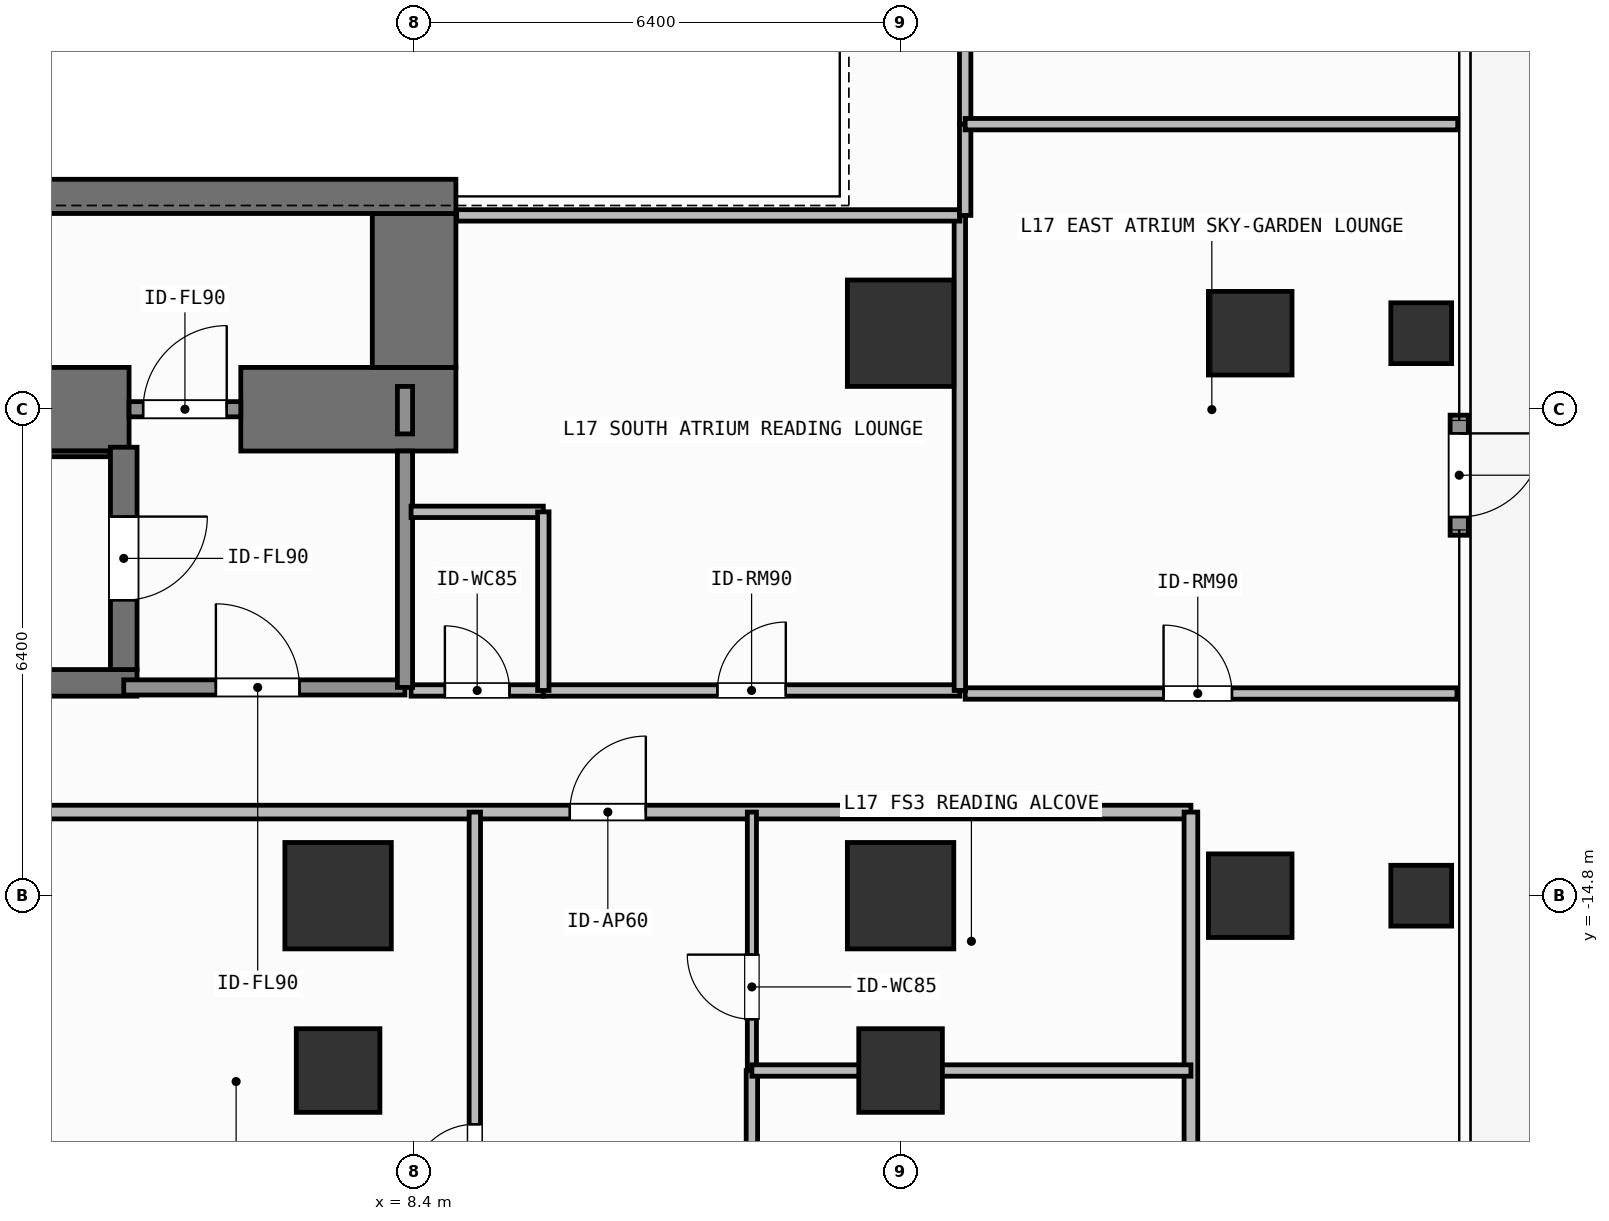
"""IFC4 building model, lengths in metres.
Left out: names, types, materials, properties, quantities, classifications, styles, units other than length and angle.
Written with IfcOpenShell. Run it as: python <this file> out.ifc"""

import sys

from ifc_helpers import new_model, si_unit, direction, frame, frame_2d, origin, origin_2d, place, context, subcontext, project, spatial, rectangle, hollow_rectangle, extrude, element, fill, save


model = new_model("IFC4")
c1 = context("Model", 3, precision=1e-05, world=origin(), true_north=direction((0.0, 1.0)))
c2 = subcontext(c1, "Body", "Model", "MODEL_VIEW")
j1 = project(units=[si_unit("LENGTHUNIT", "METRE"), si_unit("PLANEANGLEUNIT", "RADIAN")], contexts=[c1])
p1 = place(None, origin())
s1 = spatial("IfcSite", under=j1, at=p1, CompositionType="ELEMENT")
p2 = place(p1, origin())
s2 = spatial("IfcBuilding", under=s1, at=p2, CompositionType="ELEMENT")
p3 = place(p2, frame((0.0, 0.0, 65.7)))
s3 = spatial("IfcBuildingStorey", under=s2, at=p3, CompositionType="ELEMENT", Elevation=65.7)
p4 = place(p3, frame((-2.62, -8.4, 0.0), z_axis=(0.0, 0.0, 1.0), x_axis=(1.0, 0.0, 0.0)))
e1 = element("IfcWall", 1, at=p4, inside=s3, PredefinedType="SHEAR", context=c2, shape_type="SweptSolid", body=[
    extrude(rectangle(XDim=7.27, YDim=1.1, at=frame_2d((3.635, 0.0))), origin(), (0.0, 0.0, 1.0), 3.9),
])
p5 = place(p3, frame((6.12, -8.4, 0.0), z_axis=(0.0, 0.0, 1.0), x_axis=(1.0, 0.0, 0.0)))
e2 = element("IfcWall", 2, at=p5, inside=s3, PredefinedType="SHEAR", context=c2, shape_type="SweptSolid", body=[
    extrude(rectangle(XDim=2.83, YDim=1.1, at=frame_2d((1.415, 0.0))), origin(), (0.0, 0.0, 1.0), 3.9),
])
p6 = place(p3, frame((8.4, -7.85, 0.0), z_axis=(0.0, 0.0, 1.0), x_axis=(0.0, 1.0, 0.0)))
e3 = element("IfcWall", 3, at=p6, inside=s3, PredefinedType="SHEAR", context=c2, shape_type="SweptSolid", body=[
    extrude(rectangle(XDim=2.025, YDim=1.1, at=frame_2d((1.013, 0.0))), origin(), (0.0, 0.0, 1.0), 3.9),
])
p7 = place(p3, frame((3.045, -5.6, 0.0), z_axis=(0.0, 0.0, 1.0), x_axis=(1.0, 0.0, 0.0)))
e4 = element("IfcWall", 4, at=p7, inside=s3, PredefinedType="SHEAR", context=c2, shape_type="SweptSolid", body=[
    extrude(rectangle(XDim=5.905, YDim=0.45, at=frame_2d((2.953, 0.0))), origin(), (0.0, 0.0, 1.0), 3.9),
])
p8 = place(p3, frame((-2.555, -12.0, 0.0), z_axis=(0.0, 0.0, 1.0), x_axis=(1.0, 0.0, 0.0)))
e5 = element("IfcWall", 5, at=p8, inside=s3, PredefinedType="SHEAR", context=c2, shape_type="SweptSolid", body=[
    extrude(rectangle(XDim=7.31, YDim=0.35, at=frame_2d((3.655, 0.0))), origin(), (0.0, 0.0, 1.0), 3.9),
])
p9 = place(p3, frame((-2.2, -8.988, 0.0), z_axis=(0.0, 0.0, 1.0), x_axis=(1.0, 0.0, 0.0)))
e6 = element("IfcWall", 6, at=p9, inside=s3, PredefinedType="SHEAR", context=c2, shape_type="SweptSolid", body=[
    extrude(rectangle(XDim=6.6, YDim=0.075, at=frame_2d((3.3, 0.0))), origin(), (0.0, 0.0, 1.0), 3.9),
])
p10 = place(p3, frame((4.58, -8.9, 0.0), z_axis=(0.0, 0.0, 1.0), x_axis=(0.0, -1.0, 0.0)))
e7 = element("IfcWall", 7, at=p10, inside=s3, PredefinedType="SHEAR", context=c2, shape_type="SweptSolid", body=[
    extrude(rectangle(XDim=2.925, YDim=0.35, at=frame_2d((1.462, 0.0))), origin(), (0.0, 0.0, 1.0), 3.9),
])
p11 = place(p10, frame((0.913, 0.0, 0.0)))
e8 = element("IfcOpeningElement", 8, at=p11, cuts=e7, PredefinedType="OPENING", context=c2, shape_type="SweptSolid", body=[
    extrude(rectangle(XDim=1.1, YDim=2.15, at=frame_2d((0.55, 1.075))), frame((0.0, 0.185, 0.0), z_axis=(0.0, -1.0, 0.0), x_axis=(1.0, 0.0, 0.0)), (0.0, 0.0, 1.0), 0.37),
])
for number, where, z_axis, x_axis in (
    (9, (7.4, -14.8, 0.0), (0.0, 0.0, 1.0), (1.0, 0.0, 0.0)),
    (10, (14.8, -14.8, 0.0), (0.0, 0.0, 1.0), (1.0, 0.0, 0.0)),
    (11, (14.8, -7.4, 0.0), (0.0, 0.0, 1.0), (1.0, 0.0, 0.0)),
):
    element("IfcColumn", number, at=place(p3, frame(where, z_axis=z_axis, x_axis=x_axis)), inside=s3, PredefinedType="COLUMN", context=c2, shape_type="SweptSolid", body=[
        extrude(rectangle(XDim=1.4, YDim=1.4, at=origin_2d()), origin(), (0.0, 0.0, 1.0), 3.9),
    ])
for number, where, z_axis, x_axis in (
    (12, (19.4, -14.8, 0.0), (0.0, 0.0, 1.0), (1.0, 0.0, 0.0)),
    (13, (19.4, -7.4, 0.0), (0.0, 0.0, 1.0), (1.0, 0.0, 0.0)),
    (14, (7.4, -17.1, 0.0), (0.0, 0.0, 1.0), (1.0, 0.0, 0.0)),
    (15, (14.8, -17.1, 0.0), (0.0, 0.0, 1.0), (1.0, 0.0, 0.0)),
):
    element("IfcColumn", number, at=place(p3, frame(where, z_axis=z_axis, x_axis=x_axis)), inside=s3, PredefinedType="COLUMN", context=c2, shape_type="SweptSolid", body=[
        extrude(rectangle(XDim=1.1, YDim=1.1, at=origin_2d()), origin(), (0.0, 0.0, 1.0), 3.9),
    ])
for number, where, z_axis, x_axis in (
    (16, (21.65, -14.8, 0.0), (0.0, 0.0, 1.0), (1.0, 0.0, 0.0)),
    (17, (21.65, -7.4, 0.0), (0.0, 0.0, 1.0), (1.0, 0.0, 0.0)),
):
    element("IfcColumn", number, at=place(p3, frame(where, z_axis=z_axis, x_axis=x_axis)), inside=s3, PredefinedType="COLUMN", context=c2, shape_type="SweptSolid", body=[
        extrude(hollow_rectangle(XDim=0.8, YDim=0.8, WallThickness=0.036, at=origin_2d()), origin(), (0.0, 0.0, 1.0), 3.9),
    ])
p12 = place(p3, frame((22.15, -8.478, 0.0), z_axis=(0.0, 0.0, 1.0), x_axis=(0.0, -1.0, 0.0)))
e18 = element("IfcWall", 18, at=p12, inside=s3, PredefinedType="SOLIDWALL", context=c2, shape_type="SweptSolid", body=[
    extrude(rectangle(XDim=1.58, YDim=0.24, at=frame_2d((0.79, 0.0))), origin(), (0.0, 0.0, 1.0), 3.68),
])
p13 = place(p12, frame((0.24, 0.0, 0.0)))
e19 = element("IfcOpeningElement", 19, at=p13, cuts=e18, PredefinedType="OPENING", context=c2, shape_type="SweptSolid", body=[
    extrude(rectangle(XDim=1.1, YDim=2.2, at=frame_2d((0.55, 1.1))), frame((0.0, 0.13, 0.0), z_axis=(0.0, -1.0, 0.0), x_axis=(1.0, 0.0, 0.0)), (0.0, 0.0, 1.0), 0.26),
])
p14 = place(p3, frame((4.58, -12.06, 0.0), z_axis=(0.0, 0.0, 1.0), x_axis=(1.0, 0.0, 0.0)))
e20 = element("IfcWall", 20, at=p14, inside=s3, PredefinedType="SOLIDWALL", context=c2, shape_type="SweptSolid", body=[
    extrude(rectangle(XDim=3.7, YDim=0.2, at=frame_2d((1.85, 0.0))), origin(), (0.0, 0.0, 1.0), 3.68),
])
p15 = place(p14, frame((1.212, 0.0, 0.0)))
e21 = element("IfcOpeningElement", 21, at=p15, cuts=e20, PredefinedType="OPENING", context=c2, shape_type="SweptSolid", body=[
    extrude(rectangle(XDim=1.1, YDim=2.15, at=frame_2d((0.55, 1.075))), frame((0.0, 0.11, 0.0), z_axis=(0.0, -1.0, 0.0), x_axis=(1.0, 0.0, 0.0)), (0.0, 0.0, 1.0), 0.22),
])
p16 = place(p3, frame((4.65, -8.4, 0.0), z_axis=(0.0, 0.0, 1.0), x_axis=(1.0, 0.0, 0.0)))
e22 = element("IfcWall", 22, at=p16, inside=s3, PredefinedType="SOLIDWALL", context=c2, shape_type="SweptSolid", body=[
    extrude(rectangle(XDim=1.47, YDim=0.2, at=frame_2d((0.735, 0.0))), origin(), (0.0, 0.0, 1.0), 2.72),
])
p17 = place(p16, frame((0.185, 0.0, 0.0)))
e23 = element("IfcOpeningElement", 23, at=p17, cuts=e22, PredefinedType="OPENING", context=c2, shape_type="SweptSolid", body=[
    extrude(rectangle(XDim=1.1, YDim=2.15, at=frame_2d((0.55, 1.075))), frame((0.0, 0.11, 0.0), z_axis=(0.0, -1.0, 0.0), x_axis=(1.0, 0.0, 0.0)), (0.0, 0.0, 1.0), 0.22),
])
p18 = place(p3, frame((8.36, -12.1, 0.0), z_axis=(0.0, 0.0, 1.0), x_axis=(1.0, 0.0, 0.0)))
e24 = element("IfcWall", 24, at=p18, inside=s3, PredefinedType="PARTITIONING", context=c2, shape_type="SweptSolid", body=[
    extrude(rectangle(XDim=1.74, YDim=0.15, at=frame_2d((0.87, 0.0))), origin(), (0.0, 0.0, 1.0), 3.68),
])
p19 = place(p18, frame((0.445, 0.0, 0.0)))
e25 = element("IfcOpeningElement", 25, at=p19, cuts=e24, PredefinedType="OPENING", context=c2, shape_type="SweptSolid", body=[
    extrude(rectangle(XDim=0.85, YDim=2.1, at=frame_2d((0.425, 1.05))), frame((0.0, 0.085, 0.0), z_axis=(0.0, -1.0, 0.0), x_axis=(1.0, 0.0, 0.0)), (0.0, 0.0, 1.0), 0.17),
])
p20 = place(p3, frame((10.1, -12.1, 0.0), z_axis=(0.0, 0.0, 1.0), x_axis=(1.0, 0.0, 0.0)))
e26 = element("IfcWall", 26, at=p20, inside=s3, PredefinedType="PARTITIONING", context=c2, shape_type="SweptSolid", body=[
    extrude(rectangle(XDim=5.48, YDim=0.15, at=frame_2d((2.74, 0.0))), origin(), (0.0, 0.0, 1.0), 3.68),
])
p21 = place(p20, frame((2.29, 0.0, 0.0)))
e27 = element("IfcOpeningElement", 27, at=p21, cuts=e26, PredefinedType="OPENING", context=c2, shape_type="SweptSolid", body=[
    extrude(rectangle(XDim=0.9, YDim=2.1, at=frame_2d((0.45, 1.05))), frame((0.0, 0.085, 0.0), z_axis=(0.0, -1.0, 0.0), x_axis=(1.0, 0.0, 0.0)), (0.0, 0.0, 1.0), 0.17),
])
p22 = place(p3, frame((2.918, -13.7, 0.0), z_axis=(0.0, 0.0, 1.0), x_axis=(1.0, 0.0, 0.0)))
e28 = element("IfcWall", 28, at=p22, inside=s3, PredefinedType="PARTITIONING", context=c2, shape_type="SweptSolid", body=[
    extrude(rectangle(XDim=15.702, YDim=0.18, at=frame_2d((7.851, 0.0))), origin(), (0.0, 0.0, 1.0), 3.68),
])
p23 = place(p22, frame((7.531, 0.0, 0.0)))
e29 = element("IfcOpeningElement", 29, at=p23, cuts=e28, PredefinedType="OPENING", context=c2, shape_type="SweptSolid", body=[
    extrude(rectangle(XDim=1.0, YDim=2.2, at=frame_2d((0.5, 1.1))), frame((0.0, 0.1, 0.0), z_axis=(0.0, -1.0, 0.0), x_axis=(1.0, 0.0, 0.0)), (0.0, 0.0, 1.0), 0.2),
])
p24 = place(p3, frame((9.199, -20.79, 0.0), z_axis=(0.0, 0.0, 1.0), x_axis=(0.0, 1.0, 0.0)))
e30 = element("IfcWall", 30, at=p24, inside=s3, PredefinedType="PARTITIONING", context=c2, shape_type="SweptSolid", body=[
    extrude(rectangle(XDim=7.09, YDim=0.15, at=frame_2d((3.545, 0.0))), origin(), (0.0, 0.0, 1.0), 3.68),
])
p25 = place(p24, frame((2.133, 0.0, 0.0)))
e31 = element("IfcOpeningElement", 31, at=p25, cuts=e30, PredefinedType="OPENING", context=c2, shape_type="SweptSolid", body=[
    extrude(rectangle(XDim=0.85, YDim=2.1, at=frame_2d((0.425, 1.05))), frame((0.0, 0.085, 0.0), z_axis=(0.0, -1.0, 0.0), x_axis=(1.0, 0.0, 0.0)), (0.0, 0.0, 1.0), 0.17),
])
p26 = place(p3, frame((12.844, -20.79, 0.0), z_axis=(0.0, 0.0, 1.0), x_axis=(0.0, 1.0, 0.0)))
e32 = element("IfcWall", 32, at=p26, inside=s3, PredefinedType="PARTITIONING", context=c2, shape_type="SweptSolid", body=[
    extrude(rectangle(XDim=3.69, YDim=0.15, at=frame_2d((1.845, 0.0))), origin(), (0.0, 0.0, 1.0), 3.68),
])
p27 = place(p26, frame((1.42, 0.0, 0.0)))
e33 = element("IfcOpeningElement", 33, at=p27, cuts=e32, PredefinedType="OPENING", context=c2, shape_type="SweptSolid", body=[
    extrude(rectangle(XDim=0.85, YDim=2.1, at=frame_2d((0.425, 1.05))), frame((0.0, 0.085, 0.0), z_axis=(0.0, -1.0, 0.0), x_axis=(1.0, 0.0, 0.0)), (0.0, 0.0, 1.0), 0.17),
])
p28 = place(p3, frame((12.844, -17.1, 0.0), z_axis=(0.0, 0.0, 1.0), x_axis=(0.0, 1.0, 0.0)))
e34 = element("IfcWall", 34, at=p28, inside=s3, PredefinedType="PARTITIONING", context=c2, shape_type="SweptSolid", body=[
    extrude(rectangle(XDim=3.4, YDim=0.12, at=frame_2d((1.7, 0.0))), origin(), (0.0, 0.0, 1.0), 3.68),
])
p29 = place(p28, frame((0.675, 0.0, 0.0)))
e35 = element("IfcOpeningElement", 35, at=p29, cuts=e34, PredefinedType="OPENING", context=c2, shape_type="SweptSolid", body=[
    extrude(rectangle(XDim=0.85, YDim=2.1, at=frame_2d((0.425, 1.05))), frame((0.0, 0.07, 0.0), z_axis=(0.0, -1.0, 0.0), x_axis=(1.0, 0.0, 0.0)), (0.0, 0.0, 1.0), 0.14),
])
p30 = place(p3, frame((15.65, -12.14, 0.0), z_axis=(0.0, 0.0, 1.0), x_axis=(1.0, 0.0, 0.0)))
e36 = element("IfcWall", 36, at=p30, inside=s3, PredefinedType="PARTITIONING", context=c2, shape_type="SweptSolid", body=[
    extrude(rectangle(XDim=6.47, YDim=0.15, at=frame_2d((3.235, 0.0))), origin(), (0.0, 0.0, 1.0), 3.68),
])
p31 = place(p30, frame((2.61, 0.0, 0.0)))
e37 = element("IfcOpeningElement", 37, at=p31, cuts=e36, PredefinedType="OPENING", context=c2, shape_type="SweptSolid", body=[
    extrude(rectangle(XDim=0.9, YDim=2.1, at=frame_2d((0.45, 1.05))), frame((0.0, 0.085, 0.0), z_axis=(0.0, -1.0, 0.0), x_axis=(1.0, 0.0, 0.0)), (0.0, 0.0, 1.0), 0.17),
])
p32 = place(p3, frame((8.28, -12.06, 0.0), z_axis=(0.0, 0.0, 1.0), x_axis=(0.0, 1.0, 0.0)))
e38 = element("IfcWall", 38, at=p32, inside=s3, PredefinedType="SOLIDWALL", context=c2, shape_type="SweptSolid", body=[
    extrude(rectangle(XDim=3.11, YDim=0.2, at=frame_2d((1.555, 0.0))), origin(), (0.0, 0.0, 1.0), 3.68),
])
p33 = place(p3, frame((8.28, -8.725, 0.0), z_axis=(0.0, 0.0, 1.0), x_axis=(0.0, 1.0, 0.0)))
e39 = element("IfcWall", 39, at=p33, inside=s3, PredefinedType="SOLIDWALL", context=c2, shape_type="SweptSolid", body=[
    extrude(rectangle(XDim=0.625, YDim=0.2, at=frame_2d((0.312, 0.0))), origin(), (0.0, 0.0, 1.0), 3.68),
])
p34 = place(p3, frame((8.36, -9.75, 0.0), z_axis=(0.0, 0.0, 1.0), x_axis=(1.0, 0.0, 0.0)))
e40 = element("IfcWall", 40, at=p34, inside=s3, PredefinedType="PARTITIONING", context=c2, shape_type="SweptSolid", body=[
    extrude(rectangle(XDim=1.74, YDim=0.15, at=frame_2d((0.87, 0.0))), origin(), (0.0, 0.0, 1.0), 3.68),
])
p35 = place(p3, frame((10.1, -12.1, 0.0), z_axis=(0.0, 0.0, 1.0), x_axis=(0.0, 1.0, 0.0)))
e41 = element("IfcWall", 41, at=p35, inside=s3, PredefinedType="PARTITIONING", context=c2, shape_type="SweptSolid", body=[
    extrude(rectangle(XDim=2.35, YDim=0.15, at=frame_2d((1.175, 0.0))), origin(), (0.0, 0.0, 1.0), 3.68),
])
p36 = place(p3, frame((15.58, -12.1, 0.0), z_axis=(0.0, 0.0, 1.0), x_axis=(0.0, 1.0, 0.0)))
e42 = element("IfcWall", 42, at=p36, inside=s3, PredefinedType="PARTITIONING", context=c2, shape_type="SweptSolid", body=[
    extrude(rectangle(XDim=6.25, YDim=0.15, at=frame_2d((3.125, 0.0))), origin(), (0.0, 0.0, 1.0), 3.68),
])
p37 = place(p3, frame((8.96, -5.85, 0.0), z_axis=(0.0, 0.0, 1.0), x_axis=(1.0, 0.0, 0.0)))
e43 = element("IfcWall", 43, at=p37, inside=s3, PredefinedType="PARTITIONING", context=c2, shape_type="SweptSolid", body=[
    extrude(rectangle(XDim=6.62, YDim=0.15, at=frame_2d((3.31, 0.0))), origin(), (0.0, 0.0, 1.0), 3.68),
])
p38 = place(p3, frame((18.62, -23.91, 0.0), z_axis=(0.0, 0.0, 1.0), x_axis=(0.0, 1.0, 0.0)))
e44 = element("IfcWall", 44, at=p38, inside=s3, PredefinedType="PARTITIONING", context=c2, shape_type="SweptSolid", body=[
    extrude(rectangle(XDim=10.21, YDim=0.18, at=frame_2d((5.105, 0.0))), origin(), (0.0, 0.0, 1.0), 3.68),
])
p39 = place(p3, frame((12.844, -17.1, 0.0), z_axis=(0.0, 0.0, 1.0), x_axis=(1.0, 0.0, 0.0)))
e45 = element("IfcWall", 45, at=p39, inside=s3, PredefinedType="PARTITIONING", context=c2, shape_type="SweptSolid", body=[
    extrude(rectangle(XDim=5.776, YDim=0.15, at=frame_2d((2.888, 0.0))), origin(), (0.0, 0.0, 1.0), 3.082),
])
p40 = place(p3, frame((15.65, -5.85, 0.0), z_axis=(0.0, 0.0, 1.0), x_axis=(0.0, 1.0, 0.0)))
e46 = element("IfcWall", 46, at=p40, inside=s3, PredefinedType="PARTITIONING", context=c2, shape_type="SweptSolid", body=[
    extrude(rectangle(XDim=1.2, YDim=0.15, at=frame_2d((0.6, 0.0))), origin(), (0.0, 0.0, 1.0), 3.68),
])
p41 = place(p3, frame((15.65, -4.65, 0.0), z_axis=(0.0, 0.0, 1.0), x_axis=(0.0, 1.0, 0.0)))
e47 = element("IfcWall", 47, at=p41, inside=s3, PredefinedType="PARTITIONING", context=c2, shape_type="SweptSolid", body=[
    extrude(rectangle(XDim=10.5, YDim=0.15, at=frame_2d((5.25, 0.0))), origin(), (0.0, 0.0, 1.0), 3.68),
])
p42 = place(p3, frame((15.65, -4.65, 0.0), z_axis=(0.0, 0.0, 1.0), x_axis=(1.0, 0.0, 0.0)))
e48 = element("IfcWall", 48, at=p42, inside=s3, PredefinedType="PARTITIONING", context=c2, shape_type="SweptSolid", body=[
    extrude(rectangle(XDim=6.48, YDim=0.15, at=frame_2d((3.24, 0.0))), origin(), (0.0, 0.0, 1.0), 3.68),
])
p43 = place(p13, origin())
e49 = element("IfcDoor", 49, at=p43, inside=s3, OperationType="SINGLE_SWING_LEFT", PredefinedType="DOOR", context=c2, shape_type="SweptSolid", body=[
    extrude(rectangle(XDim=1.1, YDim=2.2, at=frame_2d((0.55, 1.1))), frame((0.0, 0.025, 0.0), z_axis=(0.0, -1.0, 0.0), x_axis=(1.0, 0.0, 0.0)), (0.0, 0.0, 1.0), 0.05),
])
fill(e19, e49)
p44 = place(p11, origin())
e50 = element("IfcDoor", 50, at=p44, inside=s3, OperationType="SINGLE_SWING_LEFT", PredefinedType="DOOR", context=c2, shape_type="SweptSolid", body=[
    extrude(rectangle(XDim=1.1, YDim=2.15, at=frame_2d((0.55, 1.075))), frame((0.0, 0.025, 0.0), z_axis=(0.0, -1.0, 0.0), x_axis=(1.0, 0.0, 0.0)), (0.0, 0.0, 1.0), 0.05),
])
fill(e8, e50)
p45 = place(p15, origin())
e51 = element("IfcDoor", 51, at=p45, inside=s3, OperationType="SINGLE_SWING_LEFT", PredefinedType="DOOR", context=c2, shape_type="SweptSolid", body=[
    extrude(rectangle(XDim=1.1, YDim=2.15, at=frame_2d((0.55, 1.075))), frame((0.0, 0.025, 0.0), z_axis=(0.0, -1.0, 0.0), x_axis=(1.0, 0.0, 0.0)), (0.0, 0.0, 1.0), 0.05),
])
fill(e21, e51)
p46 = place(p17, origin())
e52 = element("IfcDoor", 52, at=p46, inside=s3, OperationType="SINGLE_SWING_RIGHT", PredefinedType="DOOR", context=c2, shape_type="SweptSolid", body=[
    extrude(rectangle(XDim=1.1, YDim=2.15, at=frame_2d((0.55, 1.075))), frame((0.0, 0.025, 0.0), z_axis=(0.0, -1.0, 0.0), x_axis=(1.0, 0.0, 0.0)), (0.0, 0.0, 1.0), 0.05),
])
fill(e23, e52)
p47 = place(p19, origin())
e53 = element("IfcDoor", 53, at=p47, inside=s3, OperationType="SINGLE_SWING_LEFT", PredefinedType="DOOR", context=c2, shape_type="SweptSolid", body=[
    extrude(rectangle(XDim=0.85, YDim=2.1, at=frame_2d((0.425, 1.05))), frame((0.0, 0.025, 0.0), z_axis=(0.0, -1.0, 0.0), x_axis=(1.0, 0.0, 0.0)), (0.0, 0.0, 1.0), 0.05),
])
fill(e25, e53)
p48 = place(p21, origin())
e54 = element("IfcDoor", 54, at=p48, inside=s3, OperationType="SINGLE_SWING_RIGHT", PredefinedType="DOOR", context=c2, shape_type="SweptSolid", body=[
    extrude(rectangle(XDim=0.9, YDim=2.1, at=frame_2d((0.45, 1.05))), frame((0.0, 0.025, 0.0), z_axis=(0.0, -1.0, 0.0), x_axis=(1.0, 0.0, 0.0)), (0.0, 0.0, 1.0), 0.05),
])
fill(e27, e54)
p49 = place(p23, origin())
e55 = element("IfcDoor", 55, at=p49, inside=s3, OperationType="SINGLE_SWING_RIGHT", PredefinedType="DOOR", context=c2, shape_type="SweptSolid", body=[
    extrude(rectangle(XDim=1.0, YDim=2.2, at=frame_2d((0.5, 1.1))), frame((0.0, 0.025, 0.0), z_axis=(0.0, -1.0, 0.0), x_axis=(1.0, 0.0, 0.0)), (0.0, 0.0, 1.0), 0.05),
])
fill(e29, e55)
p50 = place(p25, origin())
e56 = element("IfcDoor", 56, at=p50, inside=s3, OperationType="SINGLE_SWING_LEFT", PredefinedType="DOOR", context=c2, shape_type="SweptSolid", body=[
    extrude(rectangle(XDim=0.85, YDim=2.1, at=frame_2d((0.425, 1.05))), frame((0.0, 0.025, 0.0), z_axis=(0.0, -1.0, 0.0), x_axis=(1.0, 0.0, 0.0)), (0.0, 0.0, 1.0), 0.05),
])
fill(e31, e56)
p51 = place(p29, origin())
e57 = element("IfcDoor", 57, at=p51, inside=s3, OperationType="SINGLE_SWING_RIGHT", PredefinedType="DOOR", context=c2, shape_type="SweptSolid", body=[
    extrude(rectangle(XDim=0.85, YDim=2.1, at=frame_2d((0.425, 1.05))), frame((0.0, 0.025, 0.0), z_axis=(0.0, -1.0, 0.0), x_axis=(1.0, 0.0, 0.0)), (0.0, 0.0, 1.0), 0.05),
])
fill(e35, e57)
p52 = place(p31, origin())
e58 = element("IfcDoor", 58, at=p52, inside=s3, OperationType="SINGLE_SWING_LEFT", PredefinedType="DOOR", context=c2, shape_type="SweptSolid", body=[
    extrude(rectangle(XDim=0.9, YDim=2.1, at=frame_2d((0.45, 1.05))), frame((0.0, 0.025, 0.0), z_axis=(0.0, -1.0, 0.0), x_axis=(1.0, 0.0, 0.0)), (0.0, 0.0, 1.0), 0.05),
])
fill(e37, e58)
save(model, sys.argv[1])
